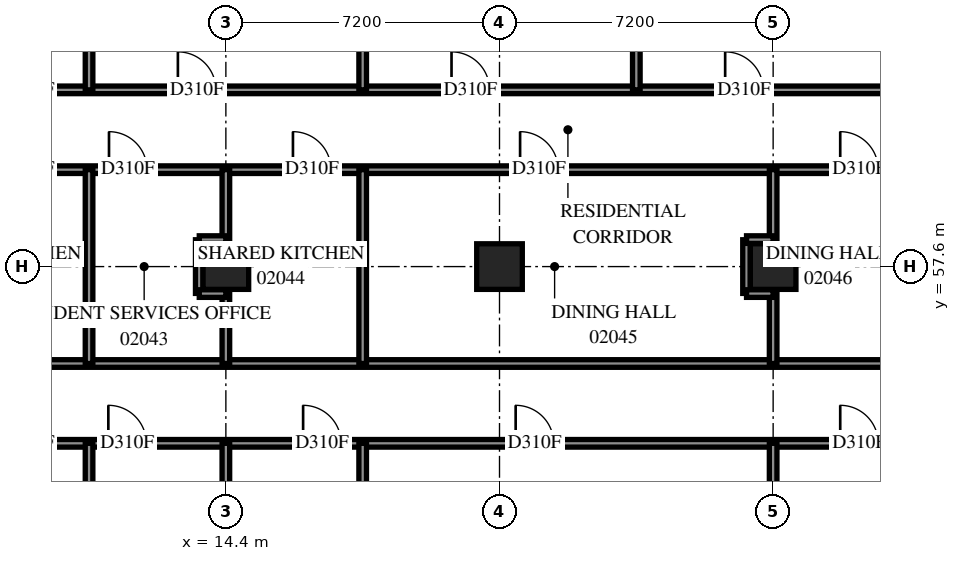
"""IFC4 building model, lengths in metres.
Left out: names, types, materials, properties, quantities, classifications, styles, units other than length and angle.
Written with IfcOpenShell. Run it as: python <this file> out.ifc"""

import sys

from ifc_helpers import new_model, si_unit, direction, frame, frame_2d, origin, origin_2d, place, context, subcontext, project, spatial, rectangle, extrude, element, fill, save


model = new_model("IFC4")
c1 = context("Model", 3, precision=1e-05, world=origin(), true_north=direction((0.0, 1.0)))
c2 = subcontext(c1, "Body", "Model", "MODEL_VIEW")
j1 = project(units=[si_unit("LENGTHUNIT", "METRE"), si_unit("PLANEANGLEUNIT", "RADIAN")], contexts=[c1])
p1 = place(None, origin())
s1 = spatial("IfcSite", under=j1, at=p1, CompositionType="ELEMENT")
p2 = place(p1, origin())
s2 = spatial("IfcBuilding", under=s1, at=p2, CompositionType="ELEMENT")
p3 = place(p2, frame((0.0, 0.0, 10.2)))
s3 = spatial("IfcBuildingStorey", under=s2, at=p3, CompositionType="ELEMENT", Elevation=10.2)
for number, where, z_axis, x_axis in (
    (1, (14.4, 57.6, 0.0), (0.0, 0.0, 1.0), (1.0, 0.0, 0.0)),
    (2, (21.6, 57.6, 0.0), (0.0, 0.0, 1.0), (1.0, 0.0, 0.0)),
    (3, (28.8, 57.6, 0.0), (0.0, 0.0, 1.0), (1.0, 0.0, 0.0)),
):
    element("IfcColumn", number, at=place(p3, frame(where, z_axis=z_axis, x_axis=x_axis)), inside=s3, PredefinedType="COLUMN", context=c2, shape_type="SweptSolid", body=[
        extrude(rectangle(XDim=1.2, YDim=1.2, at=origin_2d()), origin(), (0.0, 0.0, 1.0), 3.8),
    ])
p4 = place(p3, frame((0.0, 55.05, 0.0), z_axis=(0.0, 0.0, 1.0), x_axis=(1.0, 0.0, 0.0)))
e4 = element("IfcWall", 4, at=p4, inside=s3, PredefinedType="PARTITIONING", context=c2, shape_type="SweptSolid", body=[
    extrude(rectangle(XDim=54.5, YDim=0.2, at=frame_2d((27.25, 0.0))), origin(), (0.0, 0.0, 1.0), 3.8),
])
p5 = place(p4, frame((52.452, 0.0, 0.0)))
e5 = element("IfcOpeningElement", 5, at=p5, cuts=e4, PredefinedType="OPENING", context=c2, shape_type="SweptSolid", body=[
    extrude(rectangle(XDim=1.0, YDim=2.1, at=frame_2d((0.5, 1.05))), frame((0.0, 0.11, 0.0), z_axis=(0.0, -1.0, 0.0), x_axis=(1.0, 0.0, 0.0)), (0.0, 0.0, 1.0), 0.22),
])
p6 = place(p4, frame((2.42, 0.0, 0.0)))
e6 = element("IfcOpeningElement", 6, at=p6, cuts=e4, PredefinedType="OPENING", context=c2, shape_type="SweptSolid", body=[
    extrude(rectangle(XDim=1.0, YDim=2.1, at=frame_2d((0.5, 1.05))), frame((0.0, 0.11, 0.0), z_axis=(0.0, -1.0, 0.0), x_axis=(1.0, 0.0, 0.0)), (0.0, 0.0, 1.0), 0.22),
])
p7 = place(p3, frame((0.0, 52.95, 0.0), z_axis=(0.0, 0.0, 1.0), x_axis=(1.0, 0.0, 0.0)))
e7 = element("IfcWall", 7, at=p7, inside=s3, PredefinedType="PARTITIONING", context=c2, shape_type="SweptSolid", body=[
    extrude(rectangle(XDim=54.5, YDim=0.2, at=frame_2d((27.25, 0.0))), origin(), (0.0, 0.0, 1.0), 3.8),
])
p8 = place(p7, frame((8.669, 0.0, 0.0)))
e8 = element("IfcOpeningElement", 8, at=p8, cuts=e7, PredefinedType="OPENING", context=c2, shape_type="SweptSolid", body=[
    extrude(rectangle(XDim=1.0, YDim=2.1, at=frame_2d((0.5, 1.05))), frame((0.0, 0.11, 0.0), z_axis=(0.0, -1.0, 0.0), x_axis=(1.0, 0.0, 0.0)), (0.0, 0.0, 1.0), 0.22),
])
p9 = place(p7, frame((11.307, 0.0, 0.0)))
e9 = element("IfcOpeningElement", 9, at=p9, cuts=e7, PredefinedType="OPENING", context=c2, shape_type="SweptSolid", body=[
    extrude(rectangle(XDim=1.0, YDim=2.1, at=frame_2d((0.5, 1.05))), frame((0.0, 0.11, 0.0), z_axis=(0.0, -1.0, 0.0), x_axis=(1.0, 0.0, 0.0)), (0.0, 0.0, 1.0), 0.22),
])
p10 = place(p7, frame((16.433, 0.0, 0.0)))
e10 = element("IfcOpeningElement", 10, at=p10, cuts=e7, PredefinedType="OPENING", context=c2, shape_type="SweptSolid", body=[
    extrude(rectangle(XDim=1.0, YDim=2.1, at=frame_2d((0.5, 1.05))), frame((0.0, 0.11, 0.0), z_axis=(0.0, -1.0, 0.0), x_axis=(1.0, 0.0, 0.0)), (0.0, 0.0, 1.0), 0.22),
])
p11 = place(p7, frame((22.025, 0.0, 0.0)))
e11 = element("IfcOpeningElement", 11, at=p11, cuts=e7, PredefinedType="OPENING", context=c2, shape_type="SweptSolid", body=[
    extrude(rectangle(XDim=1.0, YDim=2.1, at=frame_2d((0.5, 1.05))), frame((0.0, 0.11, 0.0), z_axis=(0.0, -1.0, 0.0), x_axis=(1.0, 0.0, 0.0)), (0.0, 0.0, 1.0), 0.22),
])
p12 = place(p7, frame((30.565, 0.0, 0.0)))
e12 = element("IfcOpeningElement", 12, at=p12, cuts=e7, PredefinedType="OPENING", context=c2, shape_type="SweptSolid", body=[
    extrude(rectangle(XDim=1.0, YDim=2.1, at=frame_2d((0.5, 1.05))), frame((0.0, 0.11, 0.0), z_axis=(0.0, -1.0, 0.0), x_axis=(1.0, 0.0, 0.0)), (0.0, 0.0, 1.0), 0.22),
])
p13 = place(p7, frame((32.925, 0.0, 0.0)))
e13 = element("IfcOpeningElement", 13, at=p13, cuts=e7, PredefinedType="OPENING", context=c2, shape_type="SweptSolid", body=[
    extrude(rectangle(XDim=1.0, YDim=2.1, at=frame_2d((0.5, 1.05))), frame((0.0, 0.11, 0.0), z_axis=(0.0, -1.0, 0.0), x_axis=(1.0, 0.0, 0.0)), (0.0, 0.0, 1.0), 0.22),
])
p14 = place(p7, frame((37.765, 0.0, 0.0)))
e14 = element("IfcOpeningElement", 14, at=p14, cuts=e7, PredefinedType="OPENING", context=c2, shape_type="SweptSolid", body=[
    extrude(rectangle(XDim=1.0, YDim=2.1, at=frame_2d((0.5, 1.05))), frame((0.0, 0.11, 0.0), z_axis=(0.0, -1.0, 0.0), x_axis=(1.0, 0.0, 0.0)), (0.0, 0.0, 1.0), 0.22),
])
p15 = place(p7, frame((40.125, 0.0, 0.0)))
e15 = element("IfcOpeningElement", 15, at=p15, cuts=e7, PredefinedType="OPENING", context=c2, shape_type="SweptSolid", body=[
    extrude(rectangle(XDim=1.0, YDim=2.1, at=frame_2d((0.5, 1.05))), frame((0.0, 0.11, 0.0), z_axis=(0.0, -1.0, 0.0), x_axis=(1.0, 0.0, 0.0)), (0.0, 0.0, 1.0), 0.22),
])
p16 = place(p7, frame((44.965, 0.0, 0.0)))
e16 = element("IfcOpeningElement", 16, at=p16, cuts=e7, PredefinedType="OPENING", context=c2, shape_type="SweptSolid", body=[
    extrude(rectangle(XDim=1.0, YDim=2.1, at=frame_2d((0.5, 1.05))), frame((0.0, 0.11, 0.0), z_axis=(0.0, -1.0, 0.0), x_axis=(1.0, 0.0, 0.0)), (0.0, 0.0, 1.0), 0.22),
])
p17 = place(p7, frame((47.325, 0.0, 0.0)))
e17 = element("IfcOpeningElement", 17, at=p17, cuts=e7, PredefinedType="OPENING", context=c2, shape_type="SweptSolid", body=[
    extrude(rectangle(XDim=1.0, YDim=2.1, at=frame_2d((0.5, 1.05))), frame((0.0, 0.11, 0.0), z_axis=(0.0, -1.0, 0.0), x_axis=(1.0, 0.0, 0.0)), (0.0, 0.0, 1.0), 0.22),
])
p18 = place(p7, frame((52.165, 0.0, 0.0)))
e18 = element("IfcOpeningElement", 18, at=p18, cuts=e7, PredefinedType="OPENING", context=c2, shape_type="SweptSolid", body=[
    extrude(rectangle(XDim=1.0, YDim=2.1, at=frame_2d((0.5, 1.05))), frame((0.0, 0.11, 0.0), z_axis=(0.0, -1.0, 0.0), x_axis=(1.0, 0.0, 0.0)), (0.0, 0.0, 1.0), 0.22),
])
p19 = place(p7, frame((2.372, 0.0, 0.0)))
e19 = element("IfcOpeningElement", 19, at=p19, cuts=e7, PredefinedType="OPENING", context=c2, shape_type="SweptSolid", body=[
    extrude(rectangle(XDim=1.0, YDim=2.1, at=frame_2d((0.5, 1.05))), frame((0.0, 0.11, 0.0), z_axis=(0.0, -1.0, 0.0), x_axis=(1.0, 0.0, 0.0)), (0.0, 0.0, 1.0), 0.22),
])
p20 = place(p7, frame((4.792, 0.0, 0.0)))
e20 = element("IfcOpeningElement", 20, at=p20, cuts=e7, PredefinedType="OPENING", context=c2, shape_type="SweptSolid", body=[
    extrude(rectangle(XDim=1.0, YDim=2.1, at=frame_2d((0.5, 1.05))), frame((0.0, 0.11, 0.0), z_axis=(0.0, -1.0, 0.0), x_axis=(1.0, 0.0, 0.0)), (0.0, 0.0, 1.0), 0.22),
])
p21 = place(p3, frame((0.002, 60.15, 0.0), z_axis=(0.0, 0.0, 1.0), x_axis=(1.0, 0.0, 0.0)))
e21 = element("IfcWall", 21, at=p21, inside=s3, PredefinedType="PARTITIONING", context=c2, shape_type="SweptSolid", body=[
    extrude(rectangle(XDim=54.498, YDim=0.2, at=frame_2d((27.249, 0.0))), origin(), (0.0, 0.0, 1.0), 3.8),
])
p22 = place(p21, frame((8.667, 0.0, 0.0)))
e22 = element("IfcOpeningElement", 22, at=p22, cuts=e21, PredefinedType="OPENING", context=c2, shape_type="SweptSolid", body=[
    extrude(rectangle(XDim=1.0, YDim=2.1, at=frame_2d((0.5, 1.05))), frame((0.0, 0.11, 0.0), z_axis=(0.0, -1.0, 0.0), x_axis=(1.0, 0.0, 0.0)), (0.0, 0.0, 1.0), 0.22),
])
p23 = place(p21, frame((11.323, 0.0, 0.0)))
e23 = element("IfcOpeningElement", 23, at=p23, cuts=e21, PredefinedType="OPENING", context=c2, shape_type="SweptSolid", body=[
    extrude(rectangle(XDim=1.0, YDim=2.1, at=frame_2d((0.5, 1.05))), frame((0.0, 0.11, 0.0), z_axis=(0.0, -1.0, 0.0), x_axis=(1.0, 0.0, 0.0)), (0.0, 0.0, 1.0), 0.22),
])
p24 = place(p21, frame((16.163, 0.0, 0.0)))
e24 = element("IfcOpeningElement", 24, at=p24, cuts=e21, PredefinedType="OPENING", context=c2, shape_type="SweptSolid", body=[
    extrude(rectangle(XDim=1.0, YDim=2.1, at=frame_2d((0.5, 1.05))), frame((0.0, 0.11, 0.0), z_axis=(0.0, -1.0, 0.0), x_axis=(1.0, 0.0, 0.0)), (0.0, 0.0, 1.0), 0.22),
])
p25 = place(p21, frame((22.14, 0.0, 0.0)))
e25 = element("IfcOpeningElement", 25, at=p25, cuts=e21, PredefinedType="OPENING", context=c2, shape_type="SweptSolid", body=[
    extrude(rectangle(XDim=1.0, YDim=2.1, at=frame_2d((0.5, 1.05))), frame((0.0, 0.11, 0.0), z_axis=(0.0, -1.0, 0.0), x_axis=(1.0, 0.0, 0.0)), (0.0, 0.0, 1.0), 0.22),
])
p26 = place(p21, frame((30.563, 0.0, 0.0)))
e26 = element("IfcOpeningElement", 26, at=p26, cuts=e21, PredefinedType="OPENING", context=c2, shape_type="SweptSolid", body=[
    extrude(rectangle(XDim=1.0, YDim=2.1, at=frame_2d((0.5, 1.05))), frame((0.0, 0.11, 0.0), z_axis=(0.0, -1.0, 0.0), x_axis=(1.0, 0.0, 0.0)), (0.0, 0.0, 1.0), 0.22),
])
p27 = place(p21, frame((33.233, 0.0, 0.0)))
e27 = element("IfcOpeningElement", 27, at=p27, cuts=e21, PredefinedType="OPENING", context=c2, shape_type="SweptSolid", body=[
    extrude(rectangle(XDim=1.0, YDim=2.1, at=frame_2d((0.5, 1.05))), frame((0.0, 0.11, 0.0), z_axis=(0.0, -1.0, 0.0), x_axis=(1.0, 0.0, 0.0)), (0.0, 0.0, 1.0), 0.22),
])
p28 = place(p21, frame((38.073, 0.0, 0.0)))
e28 = element("IfcOpeningElement", 28, at=p28, cuts=e21, PredefinedType="OPENING", context=c2, shape_type="SweptSolid", body=[
    extrude(rectangle(XDim=1.0, YDim=2.1, at=frame_2d((0.5, 1.05))), frame((0.0, 0.11, 0.0), z_axis=(0.0, -1.0, 0.0), x_axis=(1.0, 0.0, 0.0)), (0.0, 0.0, 1.0), 0.22),
])
p29 = place(p21, frame((40.123, 0.0, 0.0)))
e29 = element("IfcOpeningElement", 29, at=p29, cuts=e21, PredefinedType="OPENING", context=c2, shape_type="SweptSolid", body=[
    extrude(rectangle(XDim=1.0, YDim=2.1, at=frame_2d((0.5, 1.05))), frame((0.0, 0.11, 0.0), z_axis=(0.0, -1.0, 0.0), x_axis=(1.0, 0.0, 0.0)), (0.0, 0.0, 1.0), 0.22),
])
p30 = place(p21, frame((44.963, 0.0, 0.0)))
e30 = element("IfcOpeningElement", 30, at=p30, cuts=e21, PredefinedType="OPENING", context=c2, shape_type="SweptSolid", body=[
    extrude(rectangle(XDim=1.0, YDim=2.1, at=frame_2d((0.5, 1.05))), frame((0.0, 0.11, 0.0), z_axis=(0.0, -1.0, 0.0), x_axis=(1.0, 0.0, 0.0)), (0.0, 0.0, 1.0), 0.22),
])
p31 = place(p21, frame((47.323, 0.0, 0.0)))
e31 = element("IfcOpeningElement", 31, at=p31, cuts=e21, PredefinedType="OPENING", context=c2, shape_type="SweptSolid", body=[
    extrude(rectangle(XDim=1.0, YDim=2.1, at=frame_2d((0.5, 1.05))), frame((0.0, 0.11, 0.0), z_axis=(0.0, -1.0, 0.0), x_axis=(1.0, 0.0, 0.0)), (0.0, 0.0, 1.0), 0.22),
])
p32 = place(p21, frame((3.747, 0.0, 0.0)))
e32 = element("IfcOpeningElement", 32, at=p32, cuts=e21, PredefinedType="OPENING", context=c2, shape_type="SweptSolid", body=[
    extrude(rectangle(XDim=1.0, YDim=2.1, at=frame_2d((0.5, 1.05))), frame((0.0, 0.11, 0.0), z_axis=(0.0, -1.0, 0.0), x_axis=(1.0, 0.0, 0.0)), (0.0, 0.0, 1.0), 0.22),
])
p33 = place(p3, frame((0.002, 62.25, 0.0), z_axis=(0.0, 0.0, 1.0), x_axis=(1.0, 0.0, 0.0)))
e33 = element("IfcWall", 33, at=p33, inside=s3, PredefinedType="PARTITIONING", context=c2, shape_type="SweptSolid", body=[
    extrude(rectangle(XDim=54.498, YDim=0.2, at=frame_2d((27.249, 0.0))), origin(), (0.0, 0.0, 1.0), 3.8),
])
p34 = place(p33, frame((8.667, 0.0, 0.0)))
e34 = element("IfcOpeningElement", 34, at=p34, cuts=e33, PredefinedType="OPENING", context=c2, shape_type="SweptSolid", body=[
    extrude(rectangle(XDim=1.0, YDim=2.1, at=frame_2d((0.5, 1.05))), frame((0.0, 0.11, 0.0), z_axis=(0.0, -1.0, 0.0), x_axis=(1.0, 0.0, 0.0)), (0.0, 0.0, 1.0), 0.22),
])
p35 = place(p33, frame((13.136, 0.0, 0.0)))
e35 = element("IfcOpeningElement", 35, at=p35, cuts=e33, PredefinedType="OPENING", context=c2, shape_type="SweptSolid", body=[
    extrude(rectangle(XDim=1.0, YDim=2.1, at=frame_2d((0.5, 1.05))), frame((0.0, 0.11, 0.0), z_axis=(0.0, -1.0, 0.0), x_axis=(1.0, 0.0, 0.0)), (0.0, 0.0, 1.0), 0.22),
])
p36 = place(p33, frame((20.335, 0.0, 0.0)))
e36 = element("IfcOpeningElement", 36, at=p36, cuts=e33, PredefinedType="OPENING", context=c2, shape_type="SweptSolid", body=[
    extrude(rectangle(XDim=1.0, YDim=2.1, at=frame_2d((0.5, 1.05))), frame((0.0, 0.11, 0.0), z_axis=(0.0, -1.0, 0.0), x_axis=(1.0, 0.0, 0.0)), (0.0, 0.0, 1.0), 0.22),
])
p37 = place(p33, frame((27.535, 0.0, 0.0)))
e37 = element("IfcOpeningElement", 37, at=p37, cuts=e33, PredefinedType="OPENING", context=c2, shape_type="SweptSolid", body=[
    extrude(rectangle(XDim=1.0, YDim=2.1, at=frame_2d((0.5, 1.05))), frame((0.0, 0.11, 0.0), z_axis=(0.0, -1.0, 0.0), x_axis=(1.0, 0.0, 0.0)), (0.0, 0.0, 1.0), 0.22),
])
p38 = place(p33, frame((34.736, 0.0, 0.0)))
e38 = element("IfcOpeningElement", 38, at=p38, cuts=e33, PredefinedType="OPENING", context=c2, shape_type="SweptSolid", body=[
    extrude(rectangle(XDim=1.0, YDim=2.1, at=frame_2d((0.5, 1.05))), frame((0.0, 0.11, 0.0), z_axis=(0.0, -1.0, 0.0), x_axis=(1.0, 0.0, 0.0)), (0.0, 0.0, 1.0), 0.22),
])
p39 = place(p33, frame((41.935, 0.0, 0.0)))
e39 = element("IfcOpeningElement", 39, at=p39, cuts=e33, PredefinedType="OPENING", context=c2, shape_type="SweptSolid", body=[
    extrude(rectangle(XDim=1.0, YDim=2.1, at=frame_2d((0.5, 1.05))), frame((0.0, 0.11, 0.0), z_axis=(0.0, -1.0, 0.0), x_axis=(1.0, 0.0, 0.0)), (0.0, 0.0, 1.0), 0.22),
])
p40 = place(p33, frame((49.136, 0.0, 0.0)))
e40 = element("IfcOpeningElement", 40, at=p40, cuts=e33, PredefinedType="OPENING", context=c2, shape_type="SweptSolid", body=[
    extrude(rectangle(XDim=1.0, YDim=2.1, at=frame_2d((0.5, 1.05))), frame((0.0, 0.11, 0.0), z_axis=(0.0, -1.0, 0.0), x_axis=(1.0, 0.0, 0.0)), (0.0, 0.0, 1.0), 0.22),
])
p41 = place(p33, frame((4.799, 0.0, 0.0)))
e41 = element("IfcOpeningElement", 41, at=p41, cuts=e33, PredefinedType="OPENING", context=c2, shape_type="SweptSolid", body=[
    extrude(rectangle(XDim=1.0, YDim=2.1, at=frame_2d((0.5, 1.05))), frame((0.0, 0.11, 0.0), z_axis=(0.0, -1.0, 0.0), x_axis=(1.0, 0.0, 0.0)), (0.0, 0.0, 1.0), 0.22),
])
p42 = place(p3, frame((18.0, 42.0, 0.0), z_axis=(0.0, 0.0, 1.0), x_axis=(0.0, 1.0, 0.0)))
e42 = element("IfcWall", 42, at=p42, inside=s3, PredefinedType="PARTITIONING", context=c2, shape_type="SweptSolid", body=[
    extrude(rectangle(XDim=10.95, YDim=0.2, at=frame_2d((5.475, 0.0))), origin(), (0.0, 0.0, 1.0), 3.8),
])
for number, where, z_axis, x_axis in (
    (43, (10.8, 42.55, 0.0), (0.0, 0.0, 1.0), (0.0, 1.0, 0.0)),
    (44, (10.8, 62.25, 0.0), (0.0, 0.0, 1.0), (0.0, 1.0, 0.0)),
    (45, (18.0, 62.25, 0.0), (0.0, 0.0, 1.0), (0.0, 1.0, 0.0)),
    (46, (25.2, 62.25, 0.0), (0.0, 0.0, 1.0), (0.0, 1.0, 0.0)),
):
    element("IfcWall", number, at=place(p3, frame(where, z_axis=z_axis, x_axis=x_axis)), inside=s3, PredefinedType="PARTITIONING", context=c2, shape_type="SweptSolid", body=[
        extrude(rectangle(XDim=10.4, YDim=0.2, at=frame_2d((5.2, 0.0))), origin(), (0.0, 0.0, 1.0), 3.8),
    ])
for number, where, z_axis, x_axis in (
    (47, (10.8, 55.05, 0.0), (0.0, 0.0, 1.0), (0.0, 1.0, 0.0)),
    (48, (18.0, 55.05, 0.0), (0.0, 0.0, 1.0), (0.0, 1.0, 0.0)),
):
    element("IfcWall", number, at=place(p3, frame(where, z_axis=z_axis, x_axis=x_axis)), inside=s3, PredefinedType="PARTITIONING", context=c2, shape_type="SweptSolid", body=[
        extrude(rectangle(XDim=5.1, YDim=0.2, at=frame_2d((2.55, 0.0))), origin(), (0.0, 0.0, 1.0), 3.8),
    ])
p43 = place(p3, frame((14.4, 51.0, 0.0), z_axis=(0.0, 0.0, 1.0), x_axis=(0.0, 1.0, 0.0)))
e49 = element("IfcWall", 49, at=p43, inside=s3, PredefinedType="PARTITIONING", context=c2, shape_type="SweptSolid", body=[
    extrude(rectangle(XDim=1.95, YDim=0.2, at=frame_2d((0.975, 0.0))), origin(), (0.0, 0.0, 1.0), 3.8),
])
for number, where, z_axis, x_axis in (
    (50, (14.4, 55.05, 0.0), (0.0, 0.0, 1.0), (0.0, 1.0, 0.0)),
    (51, (14.4, 58.306, 0.0), (0.0, 0.0, 1.0), (0.0, 1.0, 0.0)),
    (52, (28.8, 51.106, 0.0), (0.0, 0.0, 1.0), (0.0, 1.0, 0.0)),
    (53, (28.8, 55.05, 0.0), (0.0, 0.0, 1.0), (0.0, 1.0, 0.0)),
    (54, (28.8, 58.306, 0.0), (0.0, 0.0, 1.0), (0.0, 1.0, 0.0)),
):
    element("IfcWall", number, at=place(p3, frame(where, z_axis=z_axis, x_axis=x_axis)), inside=s3, PredefinedType="PARTITIONING", context=c2, shape_type="SweptSolid", body=[
        extrude(rectangle(XDim=1.844, YDim=0.2, at=frame_2d((0.922, 0.0))), origin(), (0.0, 0.0, 1.0), 3.8),
    ])
for number, where, z_axis, x_axis in (
    (55, (13.7, 56.894, 0.0), (0.0, 0.0, 1.0), (0.0, 1.0, 0.0)),
    (56, (28.1, 56.894, 0.0), (0.0, 0.0, 1.0), (0.0, 1.0, 0.0)),
):
    element("IfcWall", number, at=place(p3, frame(where, z_axis=z_axis, x_axis=x_axis)), inside=s3, PredefinedType="PARTITIONING", context=c2, shape_type="SweptSolid", body=[
        extrude(rectangle(XDim=1.412, YDim=0.2, at=frame_2d((0.706, 0.0))), origin(), (0.0, 0.0, 1.0), 3.8),
    ])
for number, where, z_axis, x_axis in (
    (57, (13.7, 58.31, 0.0), (0.0, 0.0, 1.0), (1.0, 0.0, 0.0)),
    (58, (13.7, 56.89, 0.0), (0.0, 0.0, 1.0), (1.0, 0.0, 0.0)),
    (59, (28.1, 58.31, 0.0), (0.0, 0.0, 1.0), (1.0, 0.0, 0.0)),
    (60, (28.1, 56.89, 0.0), (0.0, 0.0, 1.0), (1.0, 0.0, 0.0)),
):
    element("IfcWall", number, at=place(p3, frame(where, z_axis=z_axis, x_axis=x_axis)), inside=s3, PredefinedType="PARTITIONING", context=c2, shape_type="SweptSolid", body=[
        extrude(rectangle(XDim=0.7, YDim=0.2, at=frame_2d((0.35, 0.0))), origin(), (0.0, 0.0, 1.0), 3.8),
    ])
p44 = place(p9, origin())
e61 = element("IfcDoor", 61, at=p44, inside=s3, OperationType="SINGLE_SWING_RIGHT", PredefinedType="DOOR", context=c2, shape_type="SweptSolid", body=[
    extrude(rectangle(XDim=1.0, YDim=2.1, at=frame_2d((0.5, 1.05))), frame((0.0, 0.025, 0.0), z_axis=(0.0, -1.0, 0.0), x_axis=(1.0, 0.0, 0.0)), (0.0, 0.0, 1.0), 0.05),
])
fill(e9, e61)
p45 = place(p10, origin())
e62 = element("IfcDoor", 62, at=p45, inside=s3, OperationType="SINGLE_SWING_LEFT", PredefinedType="DOOR", context=c2, shape_type="SweptSolid", body=[
    extrude(rectangle(XDim=1.0, YDim=2.1, at=frame_2d((0.5, 1.05))), frame((0.0, 0.025, 0.0), z_axis=(0.0, -1.0, 0.0), x_axis=(1.0, 0.0, 0.0)), (0.0, 0.0, 1.0), 0.05),
])
fill(e10, e62)
p46 = place(p11, origin())
e63 = element("IfcDoor", 63, at=p46, inside=s3, OperationType="SINGLE_SWING_RIGHT", PredefinedType="DOOR", context=c2, shape_type="SweptSolid", body=[
    extrude(rectangle(XDim=1.0, YDim=2.1, at=frame_2d((0.5, 1.05))), frame((0.0, 0.025, 0.0), z_axis=(0.0, -1.0, 0.0), x_axis=(1.0, 0.0, 0.0)), (0.0, 0.0, 1.0), 0.05),
])
fill(e11, e63)
p47 = place(p12, origin())
e64 = element("IfcDoor", 64, at=p47, inside=s3, OperationType="SINGLE_SWING_LEFT", PredefinedType="DOOR", context=c2, shape_type="SweptSolid", body=[
    extrude(rectangle(XDim=1.0, YDim=2.1, at=frame_2d((0.5, 1.05))), frame((0.0, 0.025, 0.0), z_axis=(0.0, -1.0, 0.0), x_axis=(1.0, 0.0, 0.0)), (0.0, 0.0, 1.0), 0.05),
])
fill(e12, e64)
p48 = place(p23, origin())
e65 = element("IfcDoor", 65, at=p48, inside=s3, OperationType="SINGLE_SWING_RIGHT", PredefinedType="DOOR", context=c2, shape_type="SweptSolid", body=[
    extrude(rectangle(XDim=1.0, YDim=2.1, at=frame_2d((0.5, 1.05))), frame((0.0, 0.025, 0.0), z_axis=(0.0, -1.0, 0.0), x_axis=(1.0, 0.0, 0.0)), (0.0, 0.0, 1.0), 0.05),
])
fill(e23, e65)
p49 = place(p24, origin())
e66 = element("IfcDoor", 66, at=p49, inside=s3, OperationType="SINGLE_SWING_LEFT", PredefinedType="DOOR", context=c2, shape_type="SweptSolid", body=[
    extrude(rectangle(XDim=1.0, YDim=2.1, at=frame_2d((0.5, 1.05))), frame((0.0, 0.025, 0.0), z_axis=(0.0, -1.0, 0.0), x_axis=(1.0, 0.0, 0.0)), (0.0, 0.0, 1.0), 0.05),
])
fill(e24, e66)
p50 = place(p25, origin())
e67 = element("IfcDoor", 67, at=p50, inside=s3, OperationType="SINGLE_SWING_RIGHT", PredefinedType="DOOR", context=c2, shape_type="SweptSolid", body=[
    extrude(rectangle(XDim=1.0, YDim=2.1, at=frame_2d((0.5, 1.05))), frame((0.0, 0.025, 0.0), z_axis=(0.0, -1.0, 0.0), x_axis=(1.0, 0.0, 0.0)), (0.0, 0.0, 1.0), 0.05),
])
fill(e25, e67)
p51 = place(p26, origin())
e68 = element("IfcDoor", 68, at=p51, inside=s3, OperationType="SINGLE_SWING_LEFT", PredefinedType="DOOR", context=c2, shape_type="SweptSolid", body=[
    extrude(rectangle(XDim=1.0, YDim=2.1, at=frame_2d((0.5, 1.05))), frame((0.0, 0.025, 0.0), z_axis=(0.0, -1.0, 0.0), x_axis=(1.0, 0.0, 0.0)), (0.0, 0.0, 1.0), 0.05),
])
fill(e26, e68)
p52 = place(p35, origin())
e69 = element("IfcDoor", 69, at=p52, inside=s3, OperationType="SINGLE_SWING_LEFT", PredefinedType="DOOR", context=c2, shape_type="SweptSolid", body=[
    extrude(rectangle(XDim=1.0, YDim=2.1, at=frame_2d((0.5, 1.05))), frame((0.0, 0.025, 0.0), z_axis=(0.0, -1.0, 0.0), x_axis=(1.0, 0.0, 0.0)), (0.0, 0.0, 1.0), 0.05),
])
fill(e35, e69)
p53 = place(p36, origin())
e70 = element("IfcDoor", 70, at=p53, inside=s3, OperationType="SINGLE_SWING_LEFT", PredefinedType="DOOR", context=c2, shape_type="SweptSolid", body=[
    extrude(rectangle(XDim=1.0, YDim=2.1, at=frame_2d((0.5, 1.05))), frame((0.0, 0.025, 0.0), z_axis=(0.0, -1.0, 0.0), x_axis=(1.0, 0.0, 0.0)), (0.0, 0.0, 1.0), 0.05),
])
fill(e36, e70)
p54 = place(p37, origin())
e71 = element("IfcDoor", 71, at=p54, inside=s3, OperationType="SINGLE_SWING_LEFT", PredefinedType="DOOR", context=c2, shape_type="SweptSolid", body=[
    extrude(rectangle(XDim=1.0, YDim=2.1, at=frame_2d((0.5, 1.05))), frame((0.0, 0.025, 0.0), z_axis=(0.0, -1.0, 0.0), x_axis=(1.0, 0.0, 0.0)), (0.0, 0.0, 1.0), 0.05),
])
fill(e37, e71)
save(model, sys.argv[1])
